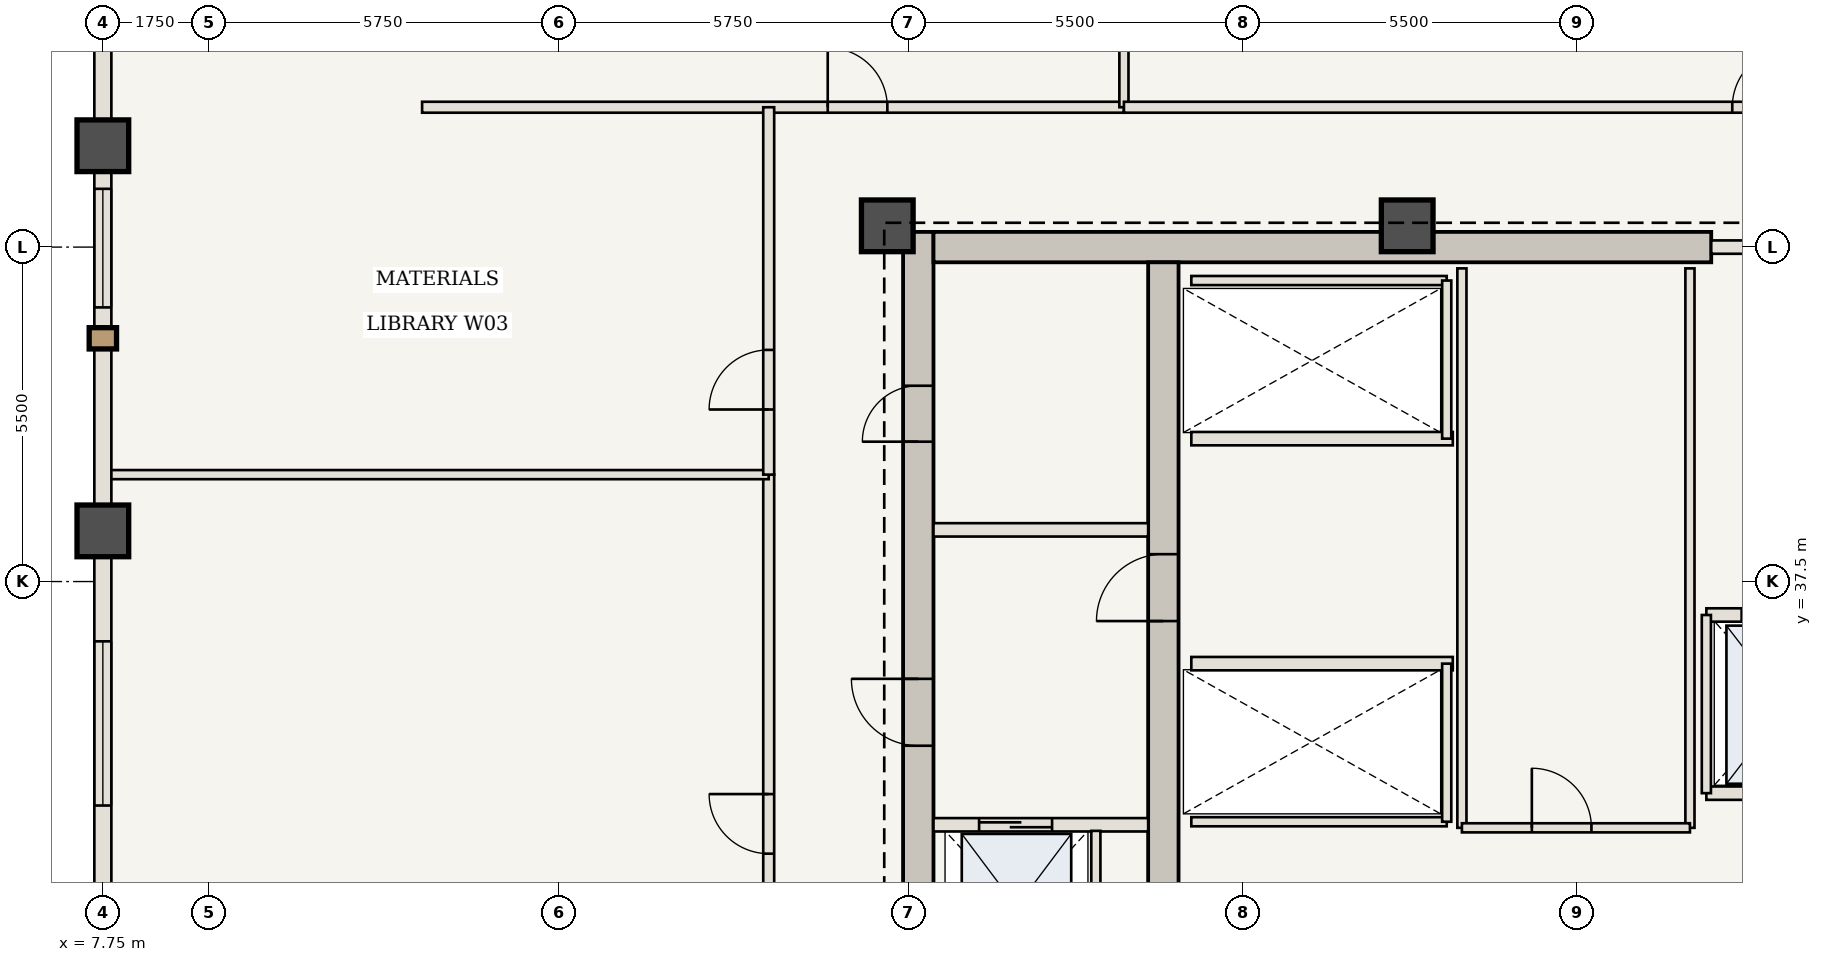
"""IFC4 building model, lengths in metres.
Left out: names, types, materials, properties, quantities, classifications, styles, units other than length and angle.
Written with IfcOpenShell. Run it as: python <this file> out.ifc"""

import sys

from ifc_helpers import new_model, si_unit, direction, frame, frame_2d, origin, origin_2d, place, context, subcontext, project, spatial, rectangle, extrude, element, fill, save


model = new_model("IFC4")
c1 = context("Model", 3, precision=1e-05, world=origin(), true_north=direction((0.0, 1.0)))
c2 = subcontext(c1, "Body", "Model", "MODEL_VIEW")
j1 = project(units=[si_unit("LENGTHUNIT", "METRE"), si_unit("PLANEANGLEUNIT", "RADIAN")], contexts=[c1])
p1 = place(None, origin())
s1 = spatial("IfcSite", under=j1, at=p1, CompositionType="ELEMENT")
p2 = place(p1, origin())
s2 = spatial("IfcBuilding", under=s1, at=p2, CompositionType="ELEMENT")
p3 = place(p2, frame((0.0, 0.0, 213.85)))
s3 = spatial("IfcBuildingStorey", under=s2, at=p3, CompositionType="ELEMENT", Elevation=213.85)
p4 = place(p3, frame((21.16, 30.6, 0.0), z_axis=(0.0, 0.0, 1.0), x_axis=(0.0, 1.0, 0.0)))
e1 = element("IfcWall", 1, at=p4, inside=s3, PredefinedType="SHEAR", context=c2, shape_type="SweptSolid", body=[
    extrude(rectangle(XDim=12.65, YDim=0.5, at=frame_2d((6.325, 0.0))), origin(), (0.0, 0.0, 1.0), 3.85),
])
p5 = place(p4, frame((4.2, 0.0, 0.0)))
e2 = element("IfcOpeningElement", 2, at=p5, cuts=e1, PredefinedType="OPENING", context=c2, shape_type="SweptSolid", body=[
    extrude(rectangle(XDim=1.1, YDim=2.15, at=frame_2d((0.55, 1.075))), frame((0.0, 0.26, 0.0), z_axis=(0.0, -1.0, 0.0), x_axis=(1.0, 0.0, 0.0)), (0.0, 0.0, 1.0), 0.52),
])
p6 = place(p4, frame((9.2, 0.0, 0.0)))
e3 = element("IfcOpeningElement", 3, at=p6, cuts=e1, PredefinedType="OPENING", context=c2, shape_type="SweptSolid", body=[
    extrude(rectangle(XDim=0.92, YDim=2.1, at=frame_2d((0.46, 1.05))), frame((0.0, 0.26, 0.0), z_axis=(0.0, -1.0, 0.0), x_axis=(1.0, 0.0, 0.0)), (0.0, 0.0, 1.0), 0.52),
])
p7 = place(p3, frame((21.41, 43.0, 0.0), z_axis=(0.0, 0.0, 1.0), x_axis=(1.0, 0.0, 0.0)))
e4 = element("IfcWall", 4, at=p7, inside=s3, PredefinedType="SHEAR", context=c2, shape_type="SweptSolid", body=[
    extrude(rectangle(XDim=12.79, YDim=0.5, at=frame_2d((6.395, 0.0))), origin(), (0.0, 0.0, 1.0), 3.85),
])
p8 = place(p3, frame((25.19, 30.6, 0.0), z_axis=(0.0, 0.0, 1.0), x_axis=(0.0, 1.0, 0.0)))
e5 = element("IfcWall", 5, at=p8, inside=s3, PredefinedType="SHEAR", context=c2, shape_type="SweptSolid", body=[
    extrude(rectangle(XDim=12.15, YDim=0.5, at=frame_2d((6.075, 0.0))), origin(), (0.0, 0.0, 1.0), 3.85),
])
p9 = place(p8, frame((6.25, 0.0, 0.0)))
e6 = element("IfcOpeningElement", 6, at=p9, cuts=e5, PredefinedType="OPENING", context=c2, shape_type="SweptSolid", body=[
    extrude(rectangle(XDim=1.1, YDim=2.15, at=frame_2d((0.55, 1.075))), frame((0.0, 0.26, 0.0), z_axis=(0.0, -1.0, 0.0), x_axis=(1.0, 0.0, 0.0)), (0.0, 0.0, 1.0), 0.52),
])
for number, where, z_axis, x_axis in (
    (7, (29.2, 43.35, 0.0), (0.0, 0.0, 1.0), (1.0, 0.0, 0.0)),
    (8, (20.65, 43.35, 0.0), (0.0, 0.0, 1.0), (1.0, 0.0, 0.0)),
    (9, (7.75, 38.333, 0.0), (0.0, 0.0, 1.0), (1.0, 0.0, 0.0)),
    (10, (7.75, 44.667, 0.0), (0.0, 0.0, 1.0), (1.0, 0.0, 0.0)),
):
    element("IfcColumn", number, at=place(p3, frame(where, z_axis=z_axis, x_axis=x_axis)), inside=s3, PredefinedType="COLUMN", context=c2, shape_type="SweptSolid", body=[
        extrude(rectangle(XDim=0.85, YDim=0.85, at=origin_2d()), origin(), (0.0, 0.0, 1.0), 3.85),
    ])
p10 = place(p3, frame((21.41, 33.5, 0.0), z_axis=(0.0, 0.0, 1.0), x_axis=(1.0, 0.0, 0.0)))
e11 = element("IfcWall", 11, at=p10, inside=s3, PredefinedType="STANDARD", context=c2, shape_type="SweptSolid", body=[
    extrude(rectangle(XDim=3.53, YDim=0.22, at=frame_2d((1.765, 0.0))), origin(), (0.0, 0.0, 1.0), 3.685),
])
p11 = place(p10, frame((0.75, 0.0, 0.0)))
e12 = element("IfcOpeningElement", 12, at=p11, cuts=e11, PredefinedType="OPENING", context=c2, shape_type="SweptSolid", body=[
    extrude(rectangle(XDim=1.2, YDim=2.2, at=frame_2d((0.6, 1.1))), frame((0.0, 0.12, 0.0), z_axis=(0.0, -1.0, 0.0), x_axis=(1.0, 0.0, 0.0)), (0.0, 0.0, 1.0), 0.24),
])
p12 = place(p3, frame((24.08, 30.75, 0.0), z_axis=(0.0, 0.0, 1.0), x_axis=(0.0, 1.0, 0.0)))
e13 = element("IfcWall", 13, at=p12, inside=s3, PredefinedType="STANDARD", context=c2, shape_type="SweptSolid", body=[
    extrude(rectangle(XDim=2.65, YDim=0.15, at=frame_2d((1.325, 0.0))), origin(), (0.0, 0.0, 1.0), 3.685),
])
p13 = place(p3, frame((21.41, 38.35, 0.0), z_axis=(0.0, 0.0, 1.0), x_axis=(1.0, 0.0, 0.0)))
e14 = element("IfcWall", 14, at=p13, inside=s3, PredefinedType="STANDARD", context=c2, shape_type="SweptSolid", body=[
    extrude(rectangle(XDim=3.53, YDim=0.22, at=frame_2d((1.765, 0.0))), origin(), (0.0, 0.0, 1.0), 3.685),
])
p14 = place(p3, frame((25.65, 36.15, 0.0), z_axis=(0.0, 0.0, 1.0), x_axis=(1.0, 0.0, 0.0)))
e15 = element("IfcWall", 15, at=p14, inside=s3, PredefinedType="STANDARD", context=c2, shape_type="SweptSolid", body=[
    extrude(rectangle(XDim=4.3, YDim=0.22, at=frame_2d((2.15, 0.0))), origin(), (0.0, 0.0, 1.0), 3.685),
])
p15 = place(p3, frame((25.65, 33.55, 0.0), z_axis=(0.0, 0.0, 1.0), x_axis=(1.0, 0.0, 0.0)))
e16 = element("IfcWall", 16, at=p15, inside=s3, PredefinedType="STANDARD", context=c2, shape_type="SweptSolid", body=[
    extrude(rectangle(XDim=4.2, YDim=0.15, at=frame_2d((2.1, 0.0))), origin(), (0.0, 0.0, 1.0), 3.685),
])
p16 = place(p3, frame((29.85, 33.55, 0.0), z_axis=(0.0, 0.0, 1.0), x_axis=(0.0, 1.0, 0.0)))
e17 = element("IfcWall", 17, at=p16, inside=s3, PredefinedType="STANDARD", context=c2, shape_type="SweptSolid", body=[
    extrude(rectangle(XDim=2.6, YDim=0.15, at=frame_2d((1.3, 0.0))), origin(), (0.0, 0.0, 1.0), 3.685),
])
p17 = place(p3, frame((25.65, 39.85, 0.0), z_axis=(0.0, 0.0, 1.0), x_axis=(1.0, 0.0, 0.0)))
e18 = element("IfcWall", 18, at=p17, inside=s3, PredefinedType="STANDARD", context=c2, shape_type="SweptSolid", body=[
    extrude(rectangle(XDim=4.3, YDim=0.22, at=frame_2d((2.15, 0.0))), origin(), (0.0, 0.0, 1.0), 3.685),
])
p18 = place(p3, frame((25.65, 42.45, 0.0), z_axis=(0.0, 0.0, 1.0), x_axis=(1.0, 0.0, 0.0)))
e19 = element("IfcWall", 19, at=p18, inside=s3, PredefinedType="STANDARD", context=c2, shape_type="SweptSolid", body=[
    extrude(rectangle(XDim=4.2, YDim=0.15, at=frame_2d((2.1, 0.0))), origin(), (0.0, 0.0, 1.0), 3.685),
])
p19 = place(p3, frame((29.85, 39.85, 0.0), z_axis=(0.0, 0.0, 1.0), x_axis=(0.0, 1.0, 0.0)))
e20 = element("IfcWall", 20, at=p19, inside=s3, PredefinedType="STANDARD", context=c2, shape_type="SweptSolid", body=[
    extrude(rectangle(XDim=2.6, YDim=0.15, at=frame_2d((1.3, 0.0))), origin(), (0.0, 0.0, 1.0), 3.685),
])
for number, where, z_axis, x_axis in (
    (21, (30.1, 33.45, 0.0), (0.0, 0.0, 1.0), (0.0, 1.0, 0.0)),
    (22, (33.85, 33.45, 0.0), (0.0, 0.0, 1.0), (0.0, 1.0, 0.0)),
):
    element("IfcWall", number, at=place(p3, frame(where, z_axis=z_axis, x_axis=x_axis)), inside=s3, PredefinedType="STANDARD", context=c2, shape_type="SweptSolid", body=[
        extrude(rectangle(XDim=9.2, YDim=0.15, at=frame_2d((4.6, 0.0))), origin(), (0.0, 0.0, 1.0), 3.685),
    ])
p20 = place(p3, frame((30.1, 33.45, 0.0), z_axis=(0.0, 0.0, 1.0), x_axis=(1.0, 0.0, 0.0)))
e23 = element("IfcWall", 23, at=p20, inside=s3, PredefinedType="STANDARD", context=c2, shape_type="SweptSolid", body=[
    extrude(rectangle(XDim=3.75, YDim=0.15, at=frame_2d((1.875, 0.0))), origin(), (0.0, 0.0, 1.0), 3.685),
])
p21 = place(p20, frame((1.15, 0.0, 0.0)))
e24 = element("IfcOpeningElement", 24, at=p21, cuts=e23, PredefinedType="OPENING", context=c2, shape_type="SweptSolid", body=[
    extrude(rectangle(XDim=0.98, YDim=2.2, at=frame_2d((0.49, 1.1))), frame((0.0, 0.085, 0.0), z_axis=(0.0, -1.0, 0.0), x_axis=(1.0, 0.0, 0.0)), (0.0, 0.0, 1.0), 0.17),
])
p22 = place(p3, frame((34.2, 43.0, 0.0), z_axis=(0.0, 0.0, 1.0), x_axis=(1.0, 0.0, 0.0)))
e25 = element("IfcWall", 25, at=p22, inside=s3, PredefinedType="STANDARD", context=c2, shape_type="SweptSolid", body=[
    extrude(rectangle(XDim=3.55, YDim=0.22, at=frame_2d((1.775, 0.0))), origin(), (0.0, 0.0, 1.0), 3.685),
])
p23 = place(p22, frame((1.4, 0.0, 0.0)))
e26 = element("IfcOpeningElement", 26, at=p23, cuts=e25, PredefinedType="OPENING", context=c2, shape_type="SweptSolid", body=[
    extrude(rectangle(XDim=1.1, YDim=2.15, at=frame_2d((0.55, 1.075))), frame((0.0, 0.12, 0.0), z_axis=(0.0, -1.0, 0.0), x_axis=(1.0, 0.0, 0.0)), (0.0, 0.0, 1.0), 0.24),
])
p24 = place(p3, frame((34.12, 36.95, 0.0), z_axis=(0.0, 0.0, 1.0), x_axis=(1.0, 0.0, 0.0)))
e27 = element("IfcWall", 27, at=p24, inside=s3, PredefinedType="STANDARD", context=c2, shape_type="SweptSolid", body=[
    extrude(rectangle(XDim=2.68, YDim=0.22, at=frame_2d((1.34, 0.0))), origin(), (0.0, 0.0, 1.0), 3.685),
])
p25 = place(p24, frame((0.58, 0.0, 0.0)))
e28 = element("IfcOpeningElement", 28, at=p25, cuts=e27, PredefinedType="OPENING", context=c2, shape_type="SweptSolid", body=[
    extrude(rectangle(XDim=1.2, YDim=2.2, at=frame_2d((0.6, 1.1))), frame((0.0, 0.12, 0.0), z_axis=(0.0, -1.0, 0.0), x_axis=(1.0, 0.0, 0.0)), (0.0, 0.0, 1.0), 0.24),
])
p26 = place(p3, frame((34.12, 34.02, 0.0), z_axis=(0.0, 0.0, 1.0), x_axis=(1.0, 0.0, 0.0)))
e29 = element("IfcWall", 29, at=p26, inside=s3, PredefinedType="STANDARD", context=c2, shape_type="SweptSolid", body=[
    extrude(rectangle(XDim=2.68, YDim=0.22, at=frame_2d((1.34, 0.0))), origin(), (0.0, 0.0, 1.0), 3.685),
])
p27 = place(p3, frame((34.12, 34.02, 0.0), z_axis=(0.0, 0.0, 1.0), x_axis=(0.0, 1.0, 0.0)))
e30 = element("IfcWall", 30, at=p27, inside=s3, PredefinedType="STANDARD", context=c2, shape_type="SweptSolid", body=[
    extrude(rectangle(XDim=2.93, YDim=0.15, at=frame_2d((1.465, 0.0))), origin(), (0.0, 0.0, 1.0), 3.685),
])
p28 = place(p3, frame((13.0, 45.3, 0.0), z_axis=(0.0, 0.0, 1.0), x_axis=(1.0, 0.0, 0.0)))
e31 = element("IfcWall", 31, at=p28, inside=s3, PredefinedType="STANDARD", context=c2, shape_type="SweptSolid", body=[
    extrude(rectangle(XDim=11.542, YDim=0.18, at=frame_2d((5.771, 0.0))), origin(), (0.0, 0.0, 1.0), 3.685),
])
p29 = place(p28, frame((6.671, 0.0, 0.0)))
e32 = element("IfcOpeningElement", 32, at=p29, cuts=e31, PredefinedType="OPENING", context=c2, shape_type="SweptSolid", body=[
    extrude(rectangle(XDim=0.98, YDim=2.2, at=frame_2d((0.49, 1.1))), frame((0.0, 0.1, 0.0), z_axis=(0.0, -1.0, 0.0), x_axis=(1.0, 0.0, 0.0)), (0.0, 0.0, 1.0), 0.2),
])
p30 = place(p3, frame((24.542, 45.3, 0.0), z_axis=(0.0, 0.0, 1.0), x_axis=(0.0, 1.0, 0.0)))
e33 = element("IfcWall", 33, at=p30, inside=s3, PredefinedType="STANDARD", context=c2, shape_type="SweptSolid", body=[
    extrude(rectangle(XDim=10.89, YDim=0.15, at=frame_2d((5.445, 0.0))), origin(), (0.0, 0.0, 1.0), 3.685),
])
p31 = place(p3, frame((24.542, 45.3, 0.0), z_axis=(0.0, 0.0, 1.0), x_axis=(1.0, 0.0, 0.0)))
e34 = element("IfcWall", 34, at=p31, inside=s3, PredefinedType="STANDARD", context=c2, shape_type="SweptSolid", body=[
    extrude(rectangle(XDim=26.458, YDim=0.18, at=frame_2d((13.229, 0.0))), origin(), (0.0, 0.0, 1.0), 3.685),
])
p32 = place(p31, frame((10.004, 0.0, 0.0)))
e35 = element("IfcOpeningElement", 35, at=p32, cuts=e34, PredefinedType="OPENING", context=c2, shape_type="SweptSolid", body=[
    extrude(rectangle(XDim=0.98, YDim=2.2, at=frame_2d((0.49, 1.1))), frame((0.0, 0.1, 0.0), z_axis=(0.0, -1.0, 0.0), x_axis=(1.0, 0.0, 0.0)), (0.0, 0.0, 1.0), 0.2),
])
p33 = place(p3, frame((18.7, 24.892, 0.0), z_axis=(0.0, 0.0, 1.0), x_axis=(0.0, 1.0, 0.0)))
e36 = element("IfcWall", 36, at=p33, inside=s3, PredefinedType="STANDARD", context=c2, shape_type="SweptSolid", body=[
    extrude(rectangle(XDim=14.367, YDim=0.18, at=frame_2d((7.183, 0.0))), origin(), (0.0, 0.0, 1.0), 3.685),
])
p34 = place(p33, frame((8.133, 0.0, 0.0)))
e37 = element("IfcOpeningElement", 37, at=p34, cuts=e36, PredefinedType="OPENING", context=c2, shape_type="SweptSolid", body=[
    extrude(rectangle(XDim=0.98, YDim=2.2, at=frame_2d((0.49, 1.1))), frame((0.0, 0.1, 0.0), z_axis=(0.0, -1.0, 0.0), x_axis=(1.0, 0.0, 0.0)), (0.0, 0.0, 1.0), 0.2),
])
p35 = place(p3, frame((7.81, 39.258, 0.0), z_axis=(0.0, 0.0, 1.0), x_axis=(1.0, 0.0, 0.0)))
e38 = element("IfcWall", 38, at=p35, inside=s3, PredefinedType="STANDARD", context=c2, shape_type="SweptSolid", body=[
    extrude(rectangle(XDim=10.89, YDim=0.15, at=frame_2d((5.445, 0.0))), origin(), (0.0, 0.0, 1.0), 3.685),
])
p36 = place(p3, frame((18.7, 39.258, 0.0), z_axis=(0.0, 0.0, 1.0), x_axis=(0.0, 1.0, 0.0)))
e39 = element("IfcWall", 39, at=p36, inside=s3, PredefinedType="STANDARD", context=c2, shape_type="SweptSolid", body=[
    extrude(rectangle(XDim=6.042, YDim=0.18, at=frame_2d((3.021, 0.0))), origin(), (0.0, 0.0, 1.0), 3.685),
])
p37 = place(p36, frame((1.071, 0.0, 0.0)))
e40 = element("IfcOpeningElement", 40, at=p37, cuts=e39, PredefinedType="OPENING", context=c2, shape_type="SweptSolid", body=[
    extrude(rectangle(XDim=0.98, YDim=2.2, at=frame_2d((0.49, 1.1))), frame((0.0, 0.1, 0.0), z_axis=(0.0, -1.0, 0.0), x_axis=(1.0, 0.0, 0.0)), (0.0, 0.0, 1.0), 0.2),
])
p38 = place(p3, frame((7.75, 32.0, 0.0), z_axis=(0.0, 0.0, 1.0), x_axis=(0.0, 1.0, 0.0)))
e41 = element("IfcWall", 41, at=p38, inside=s3, PredefinedType="USERDEFINED", context=c2, shape_type="SweptSolid", body=[
    extrude(rectangle(XDim=6.333, YDim=0.28, at=frame_2d((3.167, 0.0))), origin(), (0.0, 0.0, 1.0), 2.985),
])
p39 = place(p38, frame((1.817, 0.0, 0.85)))
e42 = element("IfcOpeningElement", 42, at=p39, cuts=e41, PredefinedType="OPENING", context=c2, shape_type="SweptSolid", body=[
    extrude(rectangle(XDim=2.7, YDim=1.935, at=frame_2d((1.35, 0.968))), frame((0.0, 0.15, 0.0), z_axis=(0.0, -1.0, 0.0), x_axis=(1.0, 0.0, 0.0)), (0.0, 0.0, 1.0), 0.3),
])
p40 = place(p3, frame((7.75, 38.333, 0.0), z_axis=(0.0, 0.0, 1.0), x_axis=(0.0, 1.0, 0.0)))
e43 = element("IfcWall", 43, at=p40, inside=s3, PredefinedType="USERDEFINED", context=c2, shape_type="SweptSolid", body=[
    extrude(rectangle(XDim=6.333, YDim=0.28, at=frame_2d((3.167, 0.0))), origin(), (0.0, 0.0, 1.0), 2.985),
])
p41 = place(p40, frame((3.675, 0.0, 0.85)))
e44 = element("IfcOpeningElement", 44, at=p41, cuts=e43, PredefinedType="OPENING", context=c2, shape_type="SweptSolid", body=[
    extrude(rectangle(XDim=1.95, YDim=1.935, at=frame_2d((0.975, 0.968))), frame((0.0, 0.15, 0.0), z_axis=(0.0, -1.0, 0.0), x_axis=(1.0, 0.0, 0.0)), (0.0, 0.0, 1.0), 0.3),
])
p42 = place(p3, frame((7.75, 44.667, 0.0), z_axis=(0.0, 0.0, 1.0), x_axis=(0.0, 1.0, 0.0)))
e45 = element("IfcWall", 45, at=p42, inside=s3, PredefinedType="USERDEFINED", context=c2, shape_type="SweptSolid", body=[
    extrude(rectangle(XDim=6.333, YDim=0.28, at=frame_2d((3.167, 0.0))), origin(), (0.0, 0.0, 1.0), 2.985),
])
p43 = place(p5, origin())
e46 = element("IfcDoor", 46, at=p43, inside=s3, OperationType="SINGLE_SWING_RIGHT", PredefinedType="DOOR", context=c2, shape_type="SweptSolid", body=[
    extrude(rectangle(XDim=1.1, YDim=2.15, at=frame_2d((0.55, 1.075))), frame((0.0, 0.025, 0.0), z_axis=(0.0, -1.0, 0.0), x_axis=(1.0, 0.0, 0.0)), (0.0, 0.0, 1.0), 0.05),
])
fill(e2, e46)
p44 = place(p9, origin())
e47 = element("IfcDoor", 47, at=p44, inside=s3, OperationType="SINGLE_SWING_LEFT", PredefinedType="DOOR", context=c2, shape_type="SweptSolid", body=[
    extrude(rectangle(XDim=1.1, YDim=2.15, at=frame_2d((0.55, 1.075))), frame((0.0, 0.025, 0.0), z_axis=(0.0, -1.0, 0.0), x_axis=(1.0, 0.0, 0.0)), (0.0, 0.0, 1.0), 0.05),
])
fill(e6, e47)
p45 = place(p6, origin())
e48 = element("IfcDoor", 48, at=p45, inside=s3, OperationType="SINGLE_SWING_LEFT", PredefinedType="DOOR", context=c2, shape_type="SweptSolid", body=[
    extrude(rectangle(XDim=0.92, YDim=2.1, at=frame_2d((0.46, 1.05))), frame((0.0, 0.025, 0.0), z_axis=(0.0, -1.0, 0.0), x_axis=(1.0, 0.0, 0.0)), (0.0, 0.0, 1.0), 0.05),
])
fill(e3, e48)
p46 = place(p11, origin())
e49 = element("IfcDoor", 49, at=p46, inside=s3, OperationType="DOUBLE_DOOR_SLIDING", PredefinedType="DOOR", context=c2, shape_type="SweptSolid", body=[
    extrude(rectangle(XDim=1.2, YDim=2.2, at=frame_2d((0.6, 1.1))), frame((0.0, 0.025, 0.0), z_axis=(0.0, -1.0, 0.0), x_axis=(1.0, 0.0, 0.0)), (0.0, 0.0, 1.0), 0.05),
])
fill(e12, e49)
p47 = place(p21, origin())
e50 = element("IfcDoor", 50, at=p47, inside=s3, OperationType="SINGLE_SWING_LEFT", PredefinedType="DOOR", context=c2, shape_type="SweptSolid", body=[
    extrude(rectangle(XDim=0.98, YDim=2.2, at=frame_2d((0.49, 1.1))), frame((0.0, 0.025, 0.0), z_axis=(0.0, -1.0, 0.0), x_axis=(1.0, 0.0, 0.0)), (0.0, 0.0, 1.0), 0.05),
])
fill(e24, e50)
p48 = place(p29, origin())
e51 = element("IfcDoor", 51, at=p48, inside=s3, OperationType="SINGLE_SWING_LEFT", PredefinedType="DOOR", context=c2, shape_type="SweptSolid", body=[
    extrude(rectangle(XDim=0.98, YDim=2.2, at=frame_2d((0.49, 1.1))), frame((0.0, 0.025, 0.0), z_axis=(0.0, -1.0, 0.0), x_axis=(1.0, 0.0, 0.0)), (0.0, 0.0, 1.0), 0.05),
])
fill(e32, e51)
p49 = place(p32, origin())
e52 = element("IfcDoor", 52, at=p49, inside=s3, OperationType="SINGLE_SWING_RIGHT", PredefinedType="DOOR", context=c2, shape_type="SweptSolid", body=[
    extrude(rectangle(XDim=0.98, YDim=2.2, at=frame_2d((0.49, 1.1))), frame((0.0, 0.025, 0.0), z_axis=(0.0, -1.0, 0.0), x_axis=(1.0, 0.0, 0.0)), (0.0, 0.0, 1.0), 0.05),
])
fill(e35, e52)
p50 = place(p34, origin())
e53 = element("IfcDoor", 53, at=p50, inside=s3, OperationType="SINGLE_SWING_RIGHT", PredefinedType="DOOR", context=c2, shape_type="SweptSolid", body=[
    extrude(rectangle(XDim=0.98, YDim=2.2, at=frame_2d((0.49, 1.1))), frame((0.0, 0.025, 0.0), z_axis=(0.0, -1.0, 0.0), x_axis=(1.0, 0.0, 0.0)), (0.0, 0.0, 1.0), 0.05),
])
fill(e37, e53)
p51 = place(p37, origin())
e54 = element("IfcDoor", 54, at=p51, inside=s3, OperationType="SINGLE_SWING_LEFT", PredefinedType="DOOR", context=c2, shape_type="SweptSolid", body=[
    extrude(rectangle(XDim=0.98, YDim=2.2, at=frame_2d((0.49, 1.1))), frame((0.0, 0.025, 0.0), z_axis=(0.0, -1.0, 0.0), x_axis=(1.0, 0.0, 0.0)), (0.0, 0.0, 1.0), 0.05),
])
fill(e40, e54)
p52 = place(p39, origin())
e55 = element("IfcWindow", 55, at=p52, inside=s3, PartitioningType="SINGLE_PANEL", PredefinedType="WINDOW", context=c2, shape_type="SweptSolid", body=[
    extrude(rectangle(XDim=2.7, YDim=1.935, at=frame_2d((1.35, 0.968))), frame((0.0, 0.03, 0.0), z_axis=(0.0, -1.0, 0.0), x_axis=(1.0, 0.0, 0.0)), (0.0, 0.0, 1.0), 0.06),
])
fill(e42, e55)
p53 = place(p41, origin())
e56 = element("IfcWindow", 56, at=p53, inside=s3, PartitioningType="SINGLE_PANEL", PredefinedType="WINDOW", context=c2, shape_type="SweptSolid", body=[
    extrude(rectangle(XDim=1.95, YDim=1.935, at=frame_2d((0.975, 0.968))), frame((0.0, 0.03, 0.0), z_axis=(0.0, -1.0, 0.0), x_axis=(1.0, 0.0, 0.0)), (0.0, 0.0, 1.0), 0.06),
])
fill(e44, e56)
save(model, sys.argv[1])
